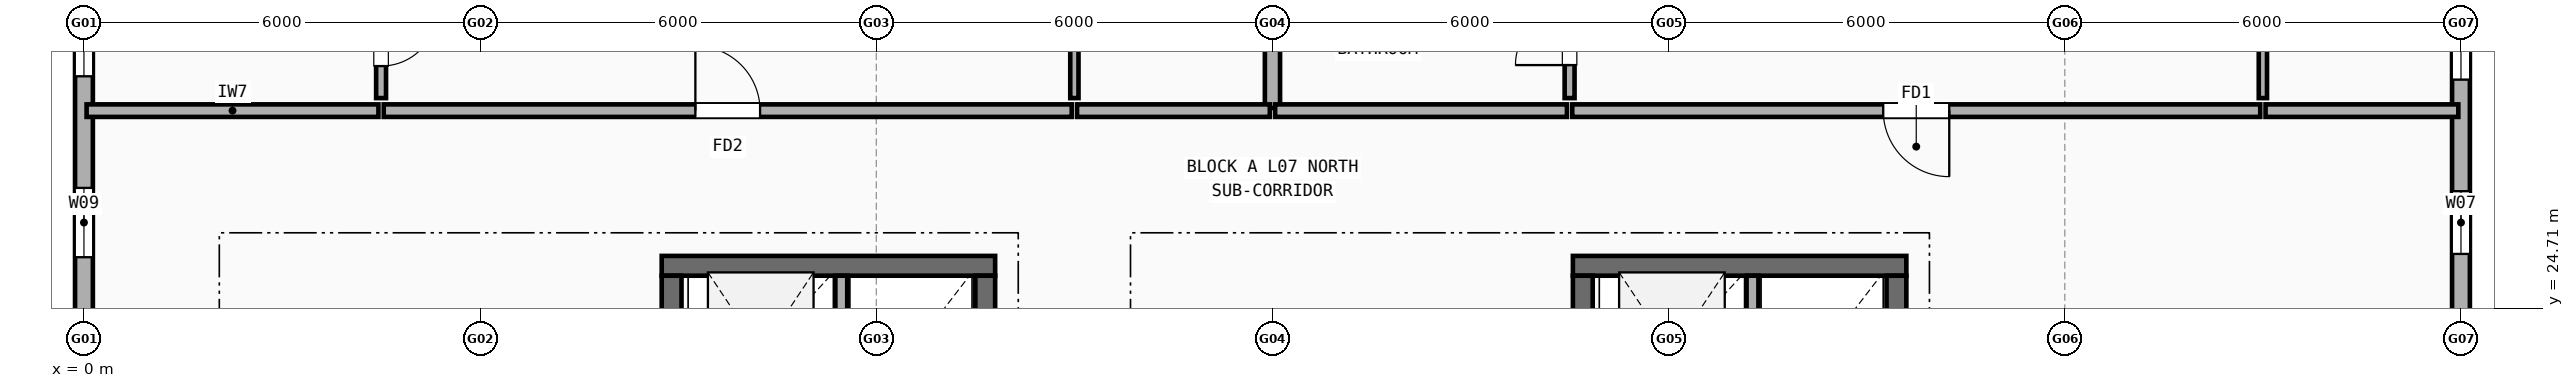
"""IFC4 building model, lengths in metres.
Left out: names, types, materials, properties, quantities, classifications, styles, units other than length and angle.
Written with IfcOpenShell. Run it as: python <this file> out.ifc"""

import sys

from ifc_helpers import new_model, si_unit, direction, frame, frame_2d, origin, place, context, subcontext, project, spatial, rectangle, extrude, element, fill, save


model = new_model("IFC4")
c1 = context("Model", 3, precision=1e-05, world=origin(), true_north=direction((0.0, 1.0)))
c2 = subcontext(c1, "Body", "Model", "MODEL_VIEW")
j1 = project(units=[si_unit("LENGTHUNIT", "METRE"), si_unit("PLANEANGLEUNIT", "RADIAN")], contexts=[c1])
p1 = place(None, origin())
s1 = spatial("IfcSite", under=j1, at=p1, CompositionType="ELEMENT")
p2 = place(p1, origin())
s2 = spatial("IfcBuilding", under=s1, at=p2, CompositionType="ELEMENT")
p3 = place(p2, frame((0.0, 0.0, 23.7)))
s3 = spatial("IfcBuildingStorey", under=s2, at=p3, CompositionType="ELEMENT", Elevation=23.7)
p4 = place(p3, frame((36.0, 24.35, 0.0), z_axis=(0.0, 0.0, 1.0), x_axis=(0.0, 1.0, 0.0)))
e1 = element("IfcWall", 1, at=p4, inside=s3, PredefinedType="STANDARD", context=c2, shape_type="SweptSolid", body=[
    extrude(rectangle(XDim=5.3, YDim=0.27, at=frame_2d((2.65, 0.0))), origin(), (0.0, 0.0, 1.0), 2.457),
])
p5 = place(p4, frame((1.18, 0.0, 0.9)))
e2 = element("IfcOpeningElement", 2, at=p5, cuts=e1, PredefinedType="OPENING", context=c2, shape_type="SweptSolid", body=[
    extrude(rectangle(XDim=0.95, YDim=1.35, at=frame_2d((0.475, 0.675))), frame((0.0, 0.145, 0.0), z_axis=(0.0, -1.0, 0.0), x_axis=(1.0, 0.0, 0.0)), (0.0, 0.0, 1.0), 0.29),
])
p6 = place(p4, frame((3.82, 0.0, 0.9)))
e3 = element("IfcOpeningElement", 3, at=p6, cuts=e1, PredefinedType="OPENING", context=c2, shape_type="SweptSolid", body=[
    extrude(rectangle(XDim=1.05, YDim=1.35, at=frame_2d((0.525, 0.675))), frame((0.0, 0.145, 0.0), z_axis=(0.0, -1.0, 0.0), x_axis=(1.0, 0.0, 0.0)), (0.0, 0.0, 1.0), 0.29),
])
p7 = place(p3, frame((0.0, 29.65, 0.0), z_axis=(0.0, 0.0, 1.0), x_axis=(0.0, -1.0, 0.0)))
e4 = element("IfcWall", 4, at=p7, inside=s3, PredefinedType="STANDARD", context=c2, shape_type="SweptSolid", body=[
    extrude(rectangle(XDim=5.3, YDim=0.27, at=frame_2d((2.65, 0.0))), origin(), (0.0, 0.0, 1.0), 2.457),
])
p8 = place(p7, frame((0.48, 0.0, 0.9)))
e5 = element("IfcOpeningElement", 5, at=p8, cuts=e4, PredefinedType="OPENING", context=c2, shape_type="SweptSolid", body=[
    extrude(rectangle(XDim=0.95, YDim=1.35, at=frame_2d((0.475, 0.675))), frame((0.0, 0.145, 0.0), z_axis=(0.0, -1.0, 0.0), x_axis=(1.0, 0.0, 0.0)), (0.0, 0.0, 1.0), 0.29),
])
p9 = place(p7, frame((3.12, 0.0, 0.9)))
e6 = element("IfcOpeningElement", 6, at=p9, cuts=e4, PredefinedType="OPENING", context=c2, shape_type="SweptSolid", body=[
    extrude(rectangle(XDim=1.05, YDim=1.35, at=frame_2d((0.525, 0.675))), frame((0.0, 0.145, 0.0), z_axis=(0.0, -1.0, 0.0), x_axis=(1.0, 0.0, 0.0)), (0.0, 0.0, 1.0), 0.29),
])
p10 = place(p3, frame((13.8, 25.35, 0.0), z_axis=(0.0, 0.0, 1.0), x_axis=(-1.0, 0.0, 0.0)))
e7 = element("IfcWall", 7, at=p10, inside=s3, PredefinedType="SHEAR", context=c2, shape_type="SweptSolid", body=[
    extrude(rectangle(XDim=5.05, YDim=0.3, at=frame_2d((2.525, 0.0))), origin(), (0.0, 0.0, 1.0), 2.975),
])
p11 = place(p3, frame((13.65, 18.75, 0.0), z_axis=(0.0, 0.0, 1.0), x_axis=(0.0, 1.0, 0.0)))
e8 = element("IfcWall", 8, at=p11, inside=s3, PredefinedType="SHEAR", context=c2, shape_type="SweptSolid", body=[
    extrude(rectangle(XDim=6.45, YDim=0.3, at=frame_2d((3.225, 0.0))), origin(), (0.0, 0.0, 1.0), 2.975),
])
p12 = place(p3, frame((8.9, 21.75, 0.0), z_axis=(0.0, 0.0, 1.0), x_axis=(0.0, 1.0, 0.0)))
e9 = element("IfcWall", 9, at=p12, inside=s3, PredefinedType="SHEAR", context=c2, shape_type="SweptSolid", body=[
    extrude(rectangle(XDim=3.45, YDim=0.3, at=frame_2d((1.725, 0.0))), origin(), (0.0, 0.0, 1.0), 2.975),
])
p13 = place(p3, frame((11.47, 22.94, 0.0), z_axis=(0.0, 0.0, 1.0), x_axis=(0.0, 1.0, 0.0)))
e10 = element("IfcWall", 10, at=p13, inside=s3, PredefinedType="SOLIDWALL", context=c2, shape_type="SweptSolid", body=[
    extrude(rectangle(XDim=2.26, YDim=0.18, at=frame_2d((1.13, 0.0))), origin(), (0.0, 0.0, 1.0), 2.975),
])
p14 = place(p3, frame((27.6, 25.35, 0.0), z_axis=(0.0, 0.0, 1.0), x_axis=(-1.0, 0.0, 0.0)))
e11 = element("IfcWall", 11, at=p14, inside=s3, PredefinedType="SHEAR", context=c2, shape_type="SweptSolid", body=[
    extrude(rectangle(XDim=5.05, YDim=0.3, at=frame_2d((2.525, 0.0))), origin(), (0.0, 0.0, 1.0), 2.975),
])
p15 = place(p3, frame((27.45, 18.75, 0.0), z_axis=(0.0, 0.0, 1.0), x_axis=(0.0, 1.0, 0.0)))
e12 = element("IfcWall", 12, at=p15, inside=s3, PredefinedType="SHEAR", context=c2, shape_type="SweptSolid", body=[
    extrude(rectangle(XDim=6.45, YDim=0.3, at=frame_2d((3.225, 0.0))), origin(), (0.0, 0.0, 1.0), 2.975),
])
p16 = place(p3, frame((22.7, 21.75, 0.0), z_axis=(0.0, 0.0, 1.0), x_axis=(0.0, 1.0, 0.0)))
e13 = element("IfcWall", 13, at=p16, inside=s3, PredefinedType="SHEAR", context=c2, shape_type="SweptSolid", body=[
    extrude(rectangle(XDim=3.45, YDim=0.3, at=frame_2d((1.725, 0.0))), origin(), (0.0, 0.0, 1.0), 2.975),
])
p17 = place(p3, frame((25.27, 22.94, 0.0), z_axis=(0.0, 0.0, 1.0), x_axis=(0.0, 1.0, 0.0)))
e14 = element("IfcWall", 14, at=p17, inside=s3, PredefinedType="SOLIDWALL", context=c2, shape_type="SweptSolid", body=[
    extrude(rectangle(XDim=2.26, YDim=0.18, at=frame_2d((1.13, 0.0))), origin(), (0.0, 0.0, 1.0), 2.975),
])
p18 = place(p3, frame((18.0, 27.74, 0.0), z_axis=(0.0, 0.0, 1.0), x_axis=(0.0, 1.0, 0.0)))
e15 = element("IfcWall", 15, at=p18, inside=s3, PredefinedType="SOLIDWALL", context=c2, shape_type="SweptSolid", body=[
    extrude(rectangle(XDim=7.87, YDim=0.23, at=frame_2d((3.935, 0.0))), origin(), (0.0, 0.0, 1.0), 2.508),
])
p19 = place(p3, frame((0.04, 27.7, 0.0), z_axis=(0.0, 0.0, 1.0), x_axis=(1.0, 0.0, 0.0)))
e16 = element("IfcWall", 16, at=p19, inside=s3, PredefinedType="SOLIDWALL", context=c2, shape_type="SweptSolid", body=[
    extrude(rectangle(XDim=4.42, YDim=0.19, at=frame_2d((2.21, 0.0))), origin(), (0.0, 0.0, 1.0), 2.457),
])
p20 = place(p3, frame((4.54, 27.7, 0.0), z_axis=(0.0, 0.0, 1.0), x_axis=(1.0, 0.0, 0.0)))
e17 = element("IfcWall", 17, at=p20, inside=s3, PredefinedType="SOLIDWALL", context=c2, shape_type="SweptSolid", body=[
    extrude(rectangle(XDim=10.42, YDim=0.19, at=frame_2d((5.21, 0.0))), origin(), (0.0, 0.0, 1.0), 2.508),
])
p21 = place(p20, frame((4.72, 0.0, 0.0)))
e18 = element("IfcOpeningElement", 18, at=p21, cuts=e17, PredefinedType="OPENING", context=c2, shape_type="SweptSolid", body=[
    extrude(rectangle(XDim=0.98, YDim=2.15, at=frame_2d((0.49, 1.075))), frame((0.0, 0.105, 0.0), z_axis=(0.0, -1.0, 0.0), x_axis=(1.0, 0.0, 0.0)), (0.0, 0.0, 1.0), 0.21),
])
p22 = place(p3, frame((4.5, 27.89, 0.0), z_axis=(0.0, 0.0, 1.0), x_axis=(0.0, 1.0, 0.0)))
e19 = element("IfcWall", 19, at=p22, inside=s3, PredefinedType="PARTITIONING", context=c2, shape_type="SweptSolid", body=[
    extrude(rectangle(XDim=1.82, YDim=0.15, at=frame_2d((0.91, 0.0))), origin(), (0.0, 0.0, 1.0), 2.975),
])
p23 = place(p22, frame((0.485, 0.0, 0.0)))
e20 = element("IfcOpeningElement", 20, at=p23, cuts=e19, PredefinedType="OPENING", context=c2, shape_type="SweptSolid", body=[
    extrude(rectangle(XDim=0.85, YDim=2.1, at=frame_2d((0.425, 1.05))), frame((0.0, 0.085, 0.0), z_axis=(0.0, -1.0, 0.0), x_axis=(1.0, 0.0, 0.0)), (0.0, 0.0, 1.0), 0.17),
])
p24 = place(p3, frame((15.04, 27.7, 0.0), z_axis=(0.0, 0.0, 1.0), x_axis=(1.0, 0.0, 0.0)))
e21 = element("IfcWall", 21, at=p24, inside=s3, PredefinedType="SOLIDWALL", context=c2, shape_type="SweptSolid", body=[
    extrude(rectangle(XDim=2.92, YDim=0.19, at=frame_2d((1.46, 0.0))), origin(), (0.0, 0.0, 1.0), 2.975),
])
p25 = place(p3, frame((15.0, 27.89, 0.0), z_axis=(0.0, 0.0, 1.0), x_axis=(0.0, 1.0, 0.0)))
e22 = element("IfcWall", 22, at=p25, inside=s3, PredefinedType="PARTITIONING", context=c2, shape_type="SweptSolid", body=[
    extrude(rectangle(XDim=7.92, YDim=0.125, at=frame_2d((3.96, 0.0))), origin(), (0.0, 0.0, 1.0), 2.457),
])
p26 = place(p25, frame((3.65, 0.0, 0.0)))
e23 = element("IfcOpeningElement", 23, at=p26, cuts=e22, PredefinedType="OPENING", context=c2, shape_type="SweptSolid", body=[
    extrude(rectangle(XDim=0.88, YDim=2.1, at=frame_2d((0.44, 1.05))), frame((0.0, 0.073, 0.0), z_axis=(0.0, -1.0, 0.0), x_axis=(1.0, 0.0, 0.0)), (0.0, 0.0, 1.0), 0.145),
])
p27 = place(p3, frame((18.04, 27.7, 0.0), z_axis=(0.0, 0.0, 1.0), x_axis=(1.0, 0.0, 0.0)))
e24 = element("IfcWall", 24, at=p27, inside=s3, PredefinedType="SOLIDWALL", context=c2, shape_type="SweptSolid", body=[
    extrude(rectangle(XDim=4.42, YDim=0.19, at=frame_2d((2.21, 0.0))), origin(), (0.0, 0.0, 1.0), 2.975),
])
p28 = place(p3, frame((22.54, 27.7, 0.0), z_axis=(0.0, 0.0, 1.0), x_axis=(1.0, 0.0, 0.0)))
e25 = element("IfcWall", 25, at=p28, inside=s3, PredefinedType="SOLIDWALL", context=c2, shape_type="SweptSolid", body=[
    extrude(rectangle(XDim=10.42, YDim=0.19, at=frame_2d((5.21, 0.0))), origin(), (0.0, 0.0, 1.0), 2.457),
])
p29 = place(p28, frame((4.71, 0.0, 0.0)))
e26 = element("IfcOpeningElement", 26, at=p29, cuts=e25, PredefinedType="OPENING", context=c2, shape_type="SweptSolid", body=[
    extrude(rectangle(XDim=1.0, YDim=2.15, at=frame_2d((0.5, 1.075))), frame((0.0, 0.105, 0.0), z_axis=(0.0, -1.0, 0.0), x_axis=(1.0, 0.0, 0.0)), (0.0, 0.0, 1.0), 0.21),
])
p30 = place(p3, frame((22.5, 27.89, 0.0), z_axis=(0.0, 0.0, 1.0), x_axis=(0.0, 1.0, 0.0)))
e27 = element("IfcWall", 27, at=p30, inside=s3, PredefinedType="PARTITIONING", context=c2, shape_type="SweptSolid", body=[
    extrude(rectangle(XDim=1.82, YDim=0.15, at=frame_2d((0.91, 0.0))), origin(), (0.0, 0.0, 1.0), 2.975),
])
p31 = place(p30, frame((0.5, 0.0, 0.0)))
e28 = element("IfcOpeningElement", 28, at=p31, cuts=e27, PredefinedType="OPENING", context=c2, shape_type="SweptSolid", body=[
    extrude(rectangle(XDim=0.82, YDim=2.08, at=frame_2d((0.41, 1.04))), frame((0.0, 0.085, 0.0), z_axis=(0.0, -1.0, 0.0), x_axis=(1.0, 0.0, 0.0)), (0.0, 0.0, 1.0), 0.17),
])
p32 = place(p3, frame((33.04, 27.7, 0.0), z_axis=(0.0, 0.0, 1.0), x_axis=(1.0, 0.0, 0.0)))
e29 = element("IfcWall", 29, at=p32, inside=s3, PredefinedType="SOLIDWALL", context=c2, shape_type="SweptSolid", body=[
    extrude(rectangle(XDim=2.92, YDim=0.19, at=frame_2d((1.46, 0.0))), origin(), (0.0, 0.0, 1.0), 2.457),
])
p33 = place(p3, frame((33.0, 27.89, 0.0), z_axis=(0.0, 0.0, 1.0), x_axis=(0.0, 1.0, 0.0)))
e30 = element("IfcWall", 30, at=p33, inside=s3, PredefinedType="PARTITIONING", context=c2, shape_type="SweptSolid", body=[
    extrude(rectangle(XDim=7.92, YDim=0.125, at=frame_2d((3.96, 0.0))), origin(), (0.0, 0.0, 1.0), 2.457),
])
p34 = place(p33, frame((3.65, 0.0, 0.0)))
e31 = element("IfcOpeningElement", 31, at=p34, cuts=e30, PredefinedType="OPENING", context=c2, shape_type="SweptSolid", body=[
    extrude(rectangle(XDim=0.9, YDim=2.1, at=frame_2d((0.45, 1.05))), frame((0.0, 0.073, 0.0), z_axis=(0.0, -1.0, 0.0), x_axis=(1.0, 0.0, 0.0)), (0.0, 0.0, 1.0), 0.145),
])
p35 = place(p5, origin())
e32 = element("IfcWindow", 32, at=p35, inside=s3, PartitioningType="SINGLE_PANEL", PredefinedType="WINDOW", context=c2, shape_type="SweptSolid", body=[
    extrude(rectangle(XDim=0.95, YDim=1.35, at=frame_2d((0.475, 0.675))), frame((0.0, 0.03, 0.0), z_axis=(0.0, -1.0, 0.0), x_axis=(1.0, 0.0, 0.0)), (0.0, 0.0, 1.0), 0.06),
])
fill(e2, e32)
p36 = place(p6, origin())
e33 = element("IfcWindow", 33, at=p36, inside=s3, PartitioningType="SINGLE_PANEL", PredefinedType="WINDOW", context=c2, shape_type="SweptSolid", body=[
    extrude(rectangle(XDim=1.05, YDim=1.35, at=frame_2d((0.525, 0.675))), frame((0.0, 0.03, 0.0), z_axis=(0.0, -1.0, 0.0), x_axis=(1.0, 0.0, 0.0)), (0.0, 0.0, 1.0), 0.06),
])
fill(e3, e33)
p37 = place(p8, origin())
e34 = element("IfcWindow", 34, at=p37, inside=s3, PartitioningType="SINGLE_PANEL", PredefinedType="WINDOW", context=c2, shape_type="SweptSolid", body=[
    extrude(rectangle(XDim=0.95, YDim=1.35, at=frame_2d((0.475, 0.675))), frame((0.0, 0.03, 0.0), z_axis=(0.0, -1.0, 0.0), x_axis=(1.0, 0.0, 0.0)), (0.0, 0.0, 1.0), 0.06),
])
fill(e5, e34)
p38 = place(p9, origin())
e35 = element("IfcWindow", 35, at=p38, inside=s3, PartitioningType="SINGLE_PANEL", PredefinedType="WINDOW", context=c2, shape_type="SweptSolid", body=[
    extrude(rectangle(XDim=1.05, YDim=1.35, at=frame_2d((0.525, 0.675))), frame((0.0, 0.03, 0.0), z_axis=(0.0, -1.0, 0.0), x_axis=(1.0, 0.0, 0.0)), (0.0, 0.0, 1.0), 0.06),
])
fill(e6, e35)
p39 = place(p21, origin())
e36 = element("IfcDoor", 36, at=p39, inside=s3, OperationType="SINGLE_SWING_LEFT", PredefinedType="DOOR", context=c2, shape_type="SweptSolid", body=[
    extrude(rectangle(XDim=0.98, YDim=2.15, at=frame_2d((0.49, 1.075))), frame((0.0, 0.025, 0.0), z_axis=(0.0, -1.0, 0.0), x_axis=(1.0, 0.0, 0.0)), (0.0, 0.0, 1.0), 0.05),
])
fill(e18, e36)
p40 = place(p23, origin())
e37 = element("IfcDoor", 37, at=p40, inside=s3, OperationType="SINGLE_SWING_RIGHT", PredefinedType="DOOR", context=c2, shape_type="SweptSolid", body=[
    extrude(rectangle(XDim=0.85, YDim=2.1, at=frame_2d((0.425, 1.05))), frame((0.0, 0.025, 0.0), z_axis=(0.0, -1.0, 0.0), x_axis=(1.0, 0.0, 0.0)), (0.0, 0.0, 1.0), 0.05),
])
fill(e20, e37)
p41 = place(p29, origin())
e38 = element("IfcDoor", 38, at=p41, inside=s3, OperationType="SINGLE_SWING_RIGHT", PredefinedType="DOOR", context=c2, shape_type="SweptSolid", body=[
    extrude(rectangle(XDim=1.0, YDim=2.15, at=frame_2d((0.5, 1.075))), frame((0.0, 0.025, 0.0), z_axis=(0.0, -1.0, 0.0), x_axis=(1.0, 0.0, 0.0)), (0.0, 0.0, 1.0), 0.05),
])
fill(e26, e38)
p42 = place(p31, origin())
e39 = element("IfcDoor", 39, at=p42, inside=s3, OperationType="SINGLE_SWING_LEFT", PredefinedType="DOOR", context=c2, shape_type="SweptSolid", body=[
    extrude(rectangle(XDim=0.82, YDim=2.08, at=frame_2d((0.41, 1.04))), frame((0.0, 0.025, 0.0), z_axis=(0.0, -1.0, 0.0), x_axis=(1.0, 0.0, 0.0)), (0.0, 0.0, 1.0), 0.05),
])
fill(e28, e39)
save(model, sys.argv[1])
